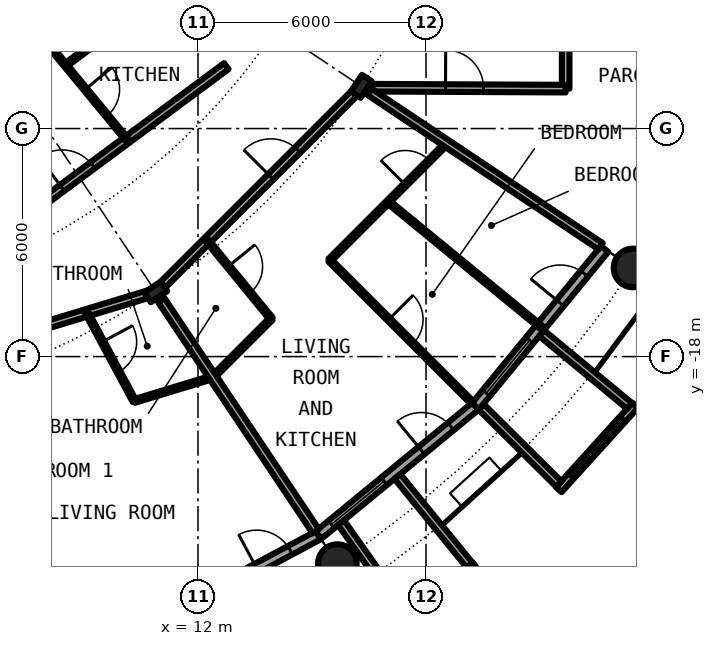
"""IFC4 building model, lengths in metres.
Left out: names, types, materials, properties, quantities, classifications, styles, units other than length and angle.
Written with IfcOpenShell. Run it as: python <this file> out.ifc"""

import sys

from ifc_helpers import new_model, si_unit, direction, frame, frame_2d, origin, origin_2d, place, context, subcontext, project, spatial, rectangle, circle, hollow_circle, i_section, extrude, element, fill, save


model = new_model("IFC4")
c1 = context("Model", 3, precision=1e-05, world=origin(), true_north=direction((0.0, 1.0)))
c2 = subcontext(c1, "Body", "Model", "MODEL_VIEW")
j1 = project(units=[si_unit("LENGTHUNIT", "METRE"), si_unit("PLANEANGLEUNIT", "RADIAN")], contexts=[c1])
p1 = place(None, origin())
s1 = spatial("IfcSite", under=j1, at=p1, CompositionType="ELEMENT")
p2 = place(p1, origin())
s2 = spatial("IfcBuilding", under=s1, at=p2, CompositionType="ELEMENT")
p3 = place(p2, frame((0.0, 0.0, 91.05)))
s3 = spatial("IfcBuildingStorey", under=s2, at=p3, CompositionType="ELEMENT", Elevation=91.05)
for number, where, z_axis, x_axis in (
    (1, (15.667, -23.448, 0.0), (0.0, 0.0, 1.0), (1.0, 0.0, 0.0)),
    (2, (23.448, -15.667, 0.0), (0.0, 0.0, 1.0), (1.0, 0.0, 0.0)),
):
    element("IfcColumn", number, at=place(p3, frame(where, z_axis=z_axis, x_axis=x_axis)), inside=s3, PredefinedType="COLUMN", context=c2, shape_type="SweptSolid", body=[
        extrude(hollow_circle(Radius=0.508, WallThickness=0.04, at=origin_2d()), origin(), (0.0, 0.0, 1.0), 3.05),
    ])
for number, where, z_axis, x_axis in (
    (3, (10.889, -16.297, 0.0), (0.0, 0.0, 1.0), (0.556, -0.831, 0.0)),
    (4, (16.297, -10.889, 0.0), (0.0, 0.0, 1.0), (0.831, -0.556, 0.0)),
):
    element("IfcColumn", number, at=place(p3, frame(where, z_axis=z_axis, x_axis=x_axis)), inside=s3, PredefinedType="COLUMN", context=c2, shape_type="SweptSolid", body=[
        extrude(i_section(OverallWidth=0.306, OverallDepth=0.524, WebThickness=0.021, FlangeThickness=0.04, FilletRadius=0.027, at=origin_2d()), origin(), (0.0, 0.0, 1.0), 3.05),
    ])
p4 = place(p3, frame((10.447, -25.222, 0.0), z_axis=(0.0, 0.0, 1.0), x_axis=(0.881915646801, 0.471407246368, 0.0)))
e5 = element("IfcWall", 5, at=p4, inside=s3, PredefinedType="SOLIDWALL", context=c2, shape_type="SweptSolid", body=[
    extrude(rectangle(XDim=5.352, YDim=0.25, at=frame_2d((2.676, 0.0))), origin(), (0.0, 0.0, 1.0), 2.7),
])
p5 = place(p4, frame((0.441, 0.0, 0.3)))
e6 = element("IfcOpeningElement", 6, at=p5, cuts=e5, PredefinedType="OPENING", context=c2, shape_type="SweptSolid", body=[
    extrude(rectangle(XDim=1.8, YDim=2.1, at=frame_2d((0.9, 1.05))), frame((0.0, 0.135, 0.0), z_axis=(0.0, -1.0, 0.0), x_axis=(1.0, 0.0, 0.0)), (0.0, 0.0, 1.0), 0.27),
])
p6 = place(p4, frame((3.51, 0.0, 0.0)))
e7 = element("IfcOpeningElement", 7, at=p6, cuts=e5, PredefinedType="OPENING", context=c2, shape_type="SweptSolid", body=[
    extrude(rectangle(XDim=1.0, YDim=2.2, at=frame_2d((0.5, 1.1))), frame((0.0, 0.135, 0.0), z_axis=(0.0, -1.0, 0.0), x_axis=(1.0, 0.0, 0.0)), (0.0, 0.0, 1.0), 0.27),
])
p7 = place(p3, frame((15.167, -22.699, 0.0), z_axis=(0.0, 0.0, 1.0), x_axis=(0.773019449054, 0.634382322723, 0.0)))
e8 = element("IfcWall", 8, at=p7, inside=s3, PredefinedType="SOLIDWALL", context=c2, shape_type="SweptSolid", body=[
    extrude(rectangle(XDim=5.352, YDim=0.25, at=frame_2d((2.676, 0.0))), origin(), (0.0, 0.0, 1.0), 2.7),
])
p8 = place(p7, frame((0.441, 0.0, 0.3)))
e9 = element("IfcOpeningElement", 9, at=p8, cuts=e8, PredefinedType="OPENING", context=c2, shape_type="SweptSolid", body=[
    extrude(rectangle(XDim=1.8, YDim=2.1, at=frame_2d((0.9, 1.05))), frame((0.0, 0.135, 0.0), z_axis=(0.0, -1.0, 0.0), x_axis=(1.0, 0.0, 0.0)), (0.0, 0.0, 1.0), 0.27),
])
p9 = place(p7, frame((3.51, 0.0, 0.0)))
e10 = element("IfcOpeningElement", 10, at=p9, cuts=e8, PredefinedType="OPENING", context=c2, shape_type="SweptSolid", body=[
    extrude(rectangle(XDim=1.0, YDim=2.2, at=frame_2d((0.5, 1.1))), frame((0.0, 0.135, 0.0), z_axis=(0.0, -1.0, 0.0), x_axis=(1.0, 0.0, 0.0)), (0.0, 0.0, 1.0), 0.27),
])
p10 = place(p3, frame((17.427, -24.909, -0.03), z_axis=(0.0, 0.0, 1.0), x_axis=(0.796842165306, 0.60418752353, 0.0)))
e11 = element("IfcWall", 11, at=p10, inside=s3, PredefinedType="SOLIDWALL", context=c2, shape_type="SweptSolid", body=[
    extrude(rectangle(XDim=2.337, YDim=0.2, at=frame_2d((1.168, 0.0))), origin(), (0.0, 0.0, 1.0), 2.73),
])
p11 = place(p10, frame((0.128, 0.0, 0.33)))
e12 = element("IfcOpeningElement", 12, at=p11, cuts=e11, PredefinedType="OPENING", context=c2, shape_type="SweptSolid", body=[
    extrude(circle(Radius=1.04, at=frame_2d((1.04, 1.04))), frame((0.0, 0.11, 0.0), z_axis=(0.0, -1.0, 0.0), x_axis=(1.0, 0.0, 0.0)), (0.0, 0.0, 1.0), 0.22),
])
p12 = place(p3, frame((15.765, -22.37, -0.03), z_axis=(0.0, 0.0, 1.0), x_axis=(0.576274612209, -0.817256123454, 0.0)))
e13 = element("IfcWall", 13, at=p12, inside=s3, PredefinedType="SOLIDWALL", context=c2, shape_type="SweptSolid", body=[
    extrude(rectangle(XDim=2.933, YDim=0.2, at=frame_2d((1.466, 0.0))), origin(), (0.0, 0.0, 1.0), 2.73),
])
p13 = place(p3, frame((17.246, -21.155, -0.03), z_axis=(0.0, 0.0, 1.0), x_axis=(0.631741648902, -0.775179004516, 0.0)))
e14 = element("IfcWall", 14, at=p13, inside=s3, PredefinedType="SOLIDWALL", context=c2, shape_type="SweptSolid", body=[
    extrude(rectangle(XDim=3.006, YDim=0.2, at=frame_2d((1.503, 0.0))), origin(), (0.0, 0.0, 1.0), 2.73),
])
p14 = place(p3, frame((19.304, -19.304, 0.0), z_axis=(0.0, 0.0, 1.0), x_axis=(0.634382322723, 0.773019449054, 0.0)))
e15 = element("IfcWall", 15, at=p14, inside=s3, PredefinedType="SOLIDWALL", context=c2, shape_type="SweptSolid", body=[
    extrude(rectangle(XDim=5.352, YDim=0.25, at=frame_2d((2.676, 0.0))), origin(), (0.0, 0.0, 1.0), 2.7),
])
p15 = place(p14, frame((0.441, 0.0, 0.3)))
e16 = element("IfcOpeningElement", 16, at=p15, cuts=e15, PredefinedType="OPENING", context=c2, shape_type="SweptSolid", body=[
    extrude(rectangle(XDim=1.8, YDim=2.1, at=frame_2d((0.9, 1.05))), frame((0.0, 0.135, 0.0), z_axis=(0.0, -1.0, 0.0), x_axis=(1.0, 0.0, 0.0)), (0.0, 0.0, 1.0), 0.27),
])
p16 = place(p14, frame((3.51, 0.0, 0.0)))
e17 = element("IfcOpeningElement", 17, at=p16, cuts=e15, PredefinedType="OPENING", context=c2, shape_type="SweptSolid", body=[
    extrude(rectangle(XDim=1.0, YDim=2.2, at=frame_2d((0.5, 1.1))), frame((0.0, 0.135, 0.0), z_axis=(0.0, -1.0, 0.0), x_axis=(1.0, 0.0, 0.0)), (0.0, 0.0, 1.0), 0.27),
])
p17 = place(p3, frame((21.493, -21.5, -0.03), z_axis=(0.0, 0.0, 1.0), x_axis=(0.671506829416, 0.740998365753, 0.0)))
e18 = element("IfcWall", 18, at=p17, inside=s3, PredefinedType="SOLIDWALL", context=c2, shape_type="SweptSolid", body=[
    extrude(rectangle(XDim=2.993, YDim=0.2, at=frame_2d((1.497, 0.0))), origin(), (0.0, 0.0, 1.0), 2.73),
])
p18 = place(p17, frame((0.457, 0.0, 0.33)))
e19 = element("IfcOpeningElement", 19, at=p18, cuts=e18, PredefinedType="OPENING", context=c2, shape_type="SweptSolid", body=[
    extrude(circle(Radius=1.04, at=frame_2d((1.04, 1.04))), frame((0.0, 0.11, 0.0), z_axis=(0.0, -1.0, 0.0), x_axis=(1.0, 0.0, 0.0)), (0.0, 0.0, 1.0), 0.22),
])
p19 = place(p3, frame((19.45, -19.323, -0.03), z_axis=(0.0, 0.0, 1.0), x_axis=(0.709727076896, -0.704476739375, 0.0)))
e20 = element("IfcWall", 20, at=p19, inside=s3, PredefinedType="SOLIDWALL", context=c2, shape_type="SweptSolid", body=[
    extrude(rectangle(XDim=2.883, YDim=0.2, at=frame_2d((1.441, 0.0))), origin(), (0.0, 0.0, 1.0), 2.73),
])
p20 = place(p3, frame((21.041, -17.384, -0.03), z_axis=(0.0, 0.0, 1.0), x_axis=(0.770784861449, -0.63709551667, 0.0)))
e21 = element("IfcWall", 21, at=p20, inside=s3, PredefinedType="SOLIDWALL", context=c2, shape_type="SweptSolid", body=[
    extrude(rectangle(XDim=3.006, YDim=0.2, at=frame_2d((1.503, 0.0))), origin(), (0.0, 0.0, 1.0), 2.73),
])
p21 = place(p3, frame((12.389, -18.542, 0.0), z_axis=(0.0, 0.0, 1.0), x_axis=(0.707106781187, 0.707106781187, 0.0)))
e22 = element("IfcWall", 22, at=p21, inside=s3, PredefinedType="PARTITIONING", context=c2, shape_type="SweptSolid", body=[
    extrude(rectangle(XDim=2.175, YDim=0.1, at=frame_2d((1.088, 0.0))), origin(), (0.0, 0.0, 1.0), 2.7),
])
p22 = place(p3, frame((15.468, -15.463, 0.0), z_axis=(0.0, 0.0, 1.0), x_axis=(0.707106781187, 0.707106781187, 0.0)))
e23 = element("IfcWall", 23, at=p22, inside=s3, PredefinedType="PARTITIONING", context=c2, shape_type="SweptSolid", body=[
    extrude(rectangle(XDim=4.351, YDim=0.1, at=frame_2d((2.176, 0.0))), origin(), (0.0, 0.0, 1.0), 2.7),
])
p23 = place(p22, frame((2.808, 0.0, 0.0)))
e24 = element("IfcOpeningElement", 24, at=p23, cuts=e23, PredefinedType="OPENING", context=c2, shape_type="SweptSolid", body=[
    extrude(rectangle(XDim=0.9, YDim=2.3, at=frame_2d((0.45, 1.15))), frame((0.0, 0.06, 0.0), z_axis=(0.0, -1.0, 0.0), x_axis=(1.0, 0.0, 0.0)), (0.0, 0.0, 1.0), 0.12),
])
p24 = place(p3, frame((21.675, -10.95, 0.0), z_axis=(0.0, 0.0, 1.0), x_axis=(0.0, 1.0, 0.0)))
e25 = element("IfcWall", 25, at=p24, inside=s3, PredefinedType="PARTITIONING", context=c2, shape_type="SweptSolid", body=[
    extrude(rectangle(XDim=1.65, YDim=0.2, at=frame_2d((0.825, 0.0))), origin(), (0.0, 0.0, 1.0), 2.7),
])
p25 = place(p3, frame((10.327, -19.168, 0.0), z_axis=(0.0, 0.0, 1.0), x_axis=(0.956877769253, 0.290490851335, 0.0)))
e26 = element("IfcWall", 26, at=p25, inside=s3, PredefinedType="PARTITIONING", context=c2, shape_type="SweptSolid", body=[
    extrude(rectangle(XDim=2.158, YDim=0.1, at=frame_2d((1.079, 0.0))), origin(), (0.0, 0.0, 1.0), 2.7),
])
p26 = place(p3, frame((11.0, -16.186, 0.0), z_axis=(0.0, 0.0, 1.0), x_axis=(0.707106781187, 0.707106781187, 0.0)))
e27 = element("IfcWall", 27, at=p26, inside=s3, PredefinedType="PARTITIONING", context=c2, shape_type="SweptSolid", body=[
    extrude(rectangle(XDim=7.334, YDim=0.2, at=frame_2d((3.667, 0.0))), origin(), (0.0, 0.0, 1.0), 2.38),
])
p27 = place(p26, frame((4.123, 0.0, 0.0)))
e28 = element("IfcOpeningElement", 28, at=p27, cuts=e27, PredefinedType="OPENING", context=c2, shape_type="SweptSolid", body=[
    extrude(rectangle(XDim=1.0, YDim=2.3, at=frame_2d((0.5, 1.15))), frame((0.0, 0.11, 0.0), z_axis=(0.0, -1.0, 0.0), x_axis=(1.0, 0.0, 0.0)), (0.0, 0.0, 1.0), 0.22),
])
p28 = place(p3, frame((0.0, -19.6, 0.0), z_axis=(0.0, 0.0, 1.0), x_axis=(0.956932298225, 0.290311172044, 0.0)))
e29 = element("IfcWall", 29, at=p28, inside=s3, PredefinedType="PARTITIONING", context=c2, shape_type="SweptSolid", body=[
    extrude(rectangle(XDim=11.219, YDim=0.2, at=frame_2d((5.61, 0.0))), origin(), (0.0, 0.0, 1.0), 2.38),
])
p29 = place(p28, frame((7.086, 0.0, 0.0)))
e30 = element("IfcOpeningElement", 30, at=p29, cuts=e29, PredefinedType="OPENING", context=c2, shape_type="SweptSolid", body=[
    extrude(rectangle(XDim=1.0, YDim=2.3, at=frame_2d((0.5, 1.15))), frame((0.0, 0.11, 0.0), z_axis=(0.0, -1.0, 0.0), x_axis=(1.0, 0.0, 0.0)), (0.0, 0.0, 1.0), 0.22),
])
p30 = place(p3, frame((4.906, -16.172, 0.0), z_axis=(0.0, 0.0, 1.0), x_axis=(0.803191461888, 0.595720971219, 0.0)))
e31 = element("IfcWall", 31, at=p30, inside=s3, PredefinedType="PARTITIONING", context=c2, shape_type="SweptSolid", body=[
    extrude(rectangle(XDim=9.76, YDim=0.2, at=frame_2d((4.88, 0.0))), origin(), (0.0, 0.0, 1.0), 2.7),
])
p31 = place(p30, frame((4.38, 0.0, 0.0)))
e32 = element("IfcOpeningElement", 32, at=p31, cuts=e31, PredefinedType="OPENING", context=c2, shape_type="SweptSolid", body=[
    extrude(rectangle(XDim=1.0, YDim=2.3, at=frame_2d((0.5, 1.15))), frame((0.0, 0.11, 0.0), z_axis=(0.0, -1.0, 0.0), x_axis=(1.0, 0.0, 0.0)), (0.0, 0.0, 1.0), 0.22),
])
p32 = place(p3, frame((8.513, -10.332, 0.0), z_axis=(0.0, 0.0, 1.0), x_axis=(0.803135014325, 0.595797070121, 0.0)))
e33 = element("IfcWall", 33, at=p32, inside=s3, PredefinedType="PARTITIONING", context=c2, shape_type="SweptSolid", body=[
    extrude(rectangle(XDim=1.732, YDim=0.1, at=frame_2d((0.866, 0.0))), origin(), (0.0, 0.0, 1.0), 2.7),
])
p33 = place(p3, frame((16.588, -10.925, 0.0), z_axis=(0.0, 0.0, 1.0), x_axis=(0.999988019025, -0.004895079807, 0.0)))
e34 = element("IfcWall", 34, at=p33, inside=s3, PredefinedType="PARTITIONING", context=c2, shape_type="SweptSolid", body=[
    extrude(rectangle(XDim=5.087, YDim=0.2, at=frame_2d((2.543, 0.0))), origin(), (0.0, 0.0, 1.0), 2.7),
])
p34 = place(p33, frame((1.925, 0.0, 0.0)))
e35 = element("IfcOpeningElement", 35, at=p34, cuts=e34, PredefinedType="OPENING", context=c2, shape_type="SweptSolid", body=[
    extrude(rectangle(XDim=1.0, YDim=2.3, at=frame_2d((0.5, 1.15))), frame((0.0, 0.11, 0.0), z_axis=(0.0, -1.0, 0.0), x_axis=(1.0, 0.0, 0.0)), (0.0, 0.0, 1.0), 0.22),
])
p35 = place(p3, frame((4.908, -5.959, 0.0), z_axis=(0.0, 0.0, 1.0), x_axis=(0.636105207978, -0.771602335652, 0.0)))
e36 = element("IfcWall", 36, at=p35, inside=s3, PredefinedType="PARTITIONING", context=c2, shape_type="SweptSolid", body=[
    extrude(rectangle(XDim=8.213, YDim=0.1, at=frame_2d((4.106, 0.0))), origin(), (0.0, 0.0, 1.0), 2.7),
])
p36 = place(p35, frame((6.49, 0.0, 0.0)))
e37 = element("IfcOpeningElement", 37, at=p36, cuts=e36, PredefinedType="OPENING", context=c2, shape_type="SweptSolid", body=[
    extrude(rectangle(XDim=0.9, YDim=2.3, at=frame_2d((0.45, 1.15))), frame((0.0, 0.06, 0.0), z_axis=(0.0, -1.0, 0.0), x_axis=(1.0, 0.0, 0.0)), (0.0, 0.0, 1.0), 0.12),
])
p37 = place(p35, frame((2.384, 0.0, 0.0)))
e38 = element("IfcOpeningElement", 38, at=p37, cuts=e36, PredefinedType="OPENING", context=c2, shape_type="SweptSolid", body=[
    extrude(rectangle(XDim=0.9, YDim=2.3, at=frame_2d((0.45, 1.15))), frame((0.0, 0.06, 0.0), z_axis=(0.0, -1.0, 0.0), x_axis=(1.0, 0.0, 0.0)), (0.0, 0.0, 1.0), 0.12),
])
p38 = place(p3, frame((9.074, -16.847, 0.0), z_axis=(0.0, 0.0, 1.0), x_axis=(0.474160570331, -0.880438387136, 0.0)))
e39 = element("IfcWall", 39, at=p38, inside=s3, PredefinedType="PARTITIONING", context=c2, shape_type="SweptSolid", body=[
    extrude(rectangle(XDim=2.636, YDim=0.1, at=frame_2d((1.318, 0.0))), origin(), (0.0, 0.0, 1.0), 2.7),
])
p39 = place(p38, frame((0.868, 0.0, 0.0)))
e40 = element("IfcOpeningElement", 40, at=p39, cuts=e39, PredefinedType="OPENING", context=c2, shape_type="SweptSolid", body=[
    extrude(rectangle(XDim=0.9, YDim=2.3, at=frame_2d((0.45, 1.15))), frame((0.0, 0.06, 0.0), z_axis=(0.0, -1.0, 0.0), x_axis=(1.0, 0.0, 0.0)), (0.0, 0.0, 1.0), 0.12),
])
p40 = place(p3, frame((11.034, -16.515, 0.0), z_axis=(0.0, 0.0, 1.0), x_axis=(0.555701298605, -0.831382022135, 0.0)))
e41 = element("IfcWall", 41, at=p40, inside=s3, PredefinedType="PARTITIONING", context=c2, shape_type="SweptSolid", body=[
    extrude(rectangle(XDim=7.313, YDim=0.2, at=frame_2d((3.657, 0.0))), origin(), (0.0, 0.0, 1.0), 2.7),
])
p41 = place(p3, frame((12.241, -14.945, 0.0), z_axis=(0.0, 0.0, 1.0), x_axis=(0.633582447834, -0.77367517848, 0.0)))
e42 = element("IfcWall", 42, at=p41, inside=s3, PredefinedType="PARTITIONING", context=c2, shape_type="SweptSolid", body=[
    extrude(rectangle(XDim=2.661, YDim=0.1, at=frame_2d((1.331, 0.0))), origin(), (0.0, 0.0, 1.0), 2.7),
])
p42 = place(p41, frame((0.881, 0.0, 0.0)))
e43 = element("IfcOpeningElement", 43, at=p42, cuts=e42, PredefinedType="OPENING", context=c2, shape_type="SweptSolid", body=[
    extrude(rectangle(XDim=0.9, YDim=2.3, at=frame_2d((0.45, 1.15))), frame((0.0, 0.06, 0.0), z_axis=(0.0, -1.0, 0.0), x_axis=(1.0, 0.0, 0.0)), (0.0, 0.0, 1.0), 0.12),
])
p43 = place(p3, frame((15.465, -15.465, 0.0), z_axis=(0.0, 0.0, 1.0), x_axis=(0.707106781187, -0.707106781187, 0.0)))
e44 = element("IfcWall", 44, at=p43, inside=s3, PredefinedType="PARTITIONING", context=c2, shape_type="SweptSolid", body=[
    extrude(rectangle(XDim=5.305, YDim=0.1, at=frame_2d((2.652, 0.0))), origin(), (0.0, 0.0, 1.0), 2.7),
])
p44 = place(p43, frame((2.202, 0.0, 0.0)))
e45 = element("IfcOpeningElement", 45, at=p44, cuts=e44, PredefinedType="OPENING", context=c2, shape_type="SweptSolid", body=[
    extrude(rectangle(XDim=0.9, YDim=2.3, at=frame_2d((0.45, 1.15))), frame((0.0, 0.06, 0.0), z_axis=(0.0, -1.0, 0.0), x_axis=(1.0, 0.0, 0.0)), (0.0, 0.0, 1.0), 0.12),
])
p45 = place(p3, frame((16.515, -11.035, 0.0), z_axis=(0.0, 0.0, 1.0), x_axis=(0.831505405283, -0.555516661303, 0.0)))
e46 = element("IfcWall", 46, at=p45, inside=s3, PredefinedType="PARTITIONING", context=c2, shape_type="SweptSolid", body=[
    extrude(rectangle(XDim=7.312, YDim=0.2, at=frame_2d((3.656, 0.0))), origin(), (0.0, 0.0, 1.0), 2.7),
])
p46 = place(p3, frame((17.004, -13.927, 0.0), z_axis=(0.0, 0.0, 1.0), x_axis=(0.773517471898, -0.633774976367, 0.0)))
e47 = element("IfcWall", 47, at=p46, inside=s3, PredefinedType="PARTITIONING", context=c2, shape_type="SweptSolid", body=[
    extrude(rectangle(XDim=5.196, YDim=0.1, at=frame_2d((2.598, 0.0))), origin(), (0.0, 0.0, 1.0), 2.7),
])
p47 = place(p6, origin())
e48 = element("IfcDoor", 48, at=p47, inside=s3, OperationType="SINGLE_SWING_LEFT", PredefinedType="DOOR", context=c2, shape_type="SweptSolid", body=[
    extrude(rectangle(XDim=1.0, YDim=2.2, at=frame_2d((0.5, 1.1))), frame((0.0, 0.025, 0.0), z_axis=(0.0, -1.0, 0.0), x_axis=(1.0, 0.0, 0.0)), (0.0, 0.0, 1.0), 0.05),
])
fill(e7, e48)
p48 = place(p8, origin())
e49 = element("IfcWindow", 49, at=p48, inside=s3, PartitioningType="SINGLE_PANEL", PredefinedType="WINDOW", context=c2, shape_type="SweptSolid", body=[
    extrude(rectangle(XDim=1.8, YDim=2.1, at=frame_2d((0.9, 1.05))), frame((0.0, 0.03, 0.0), z_axis=(0.0, -1.0, 0.0), x_axis=(1.0, 0.0, 0.0)), (0.0, 0.0, 1.0), 0.06),
])
fill(e9, e49)
p49 = place(p9, origin())
e50 = element("IfcDoor", 50, at=p49, inside=s3, OperationType="SINGLE_SWING_LEFT", PredefinedType="DOOR", context=c2, shape_type="SweptSolid", body=[
    extrude(rectangle(XDim=1.0, YDim=2.2, at=frame_2d((0.5, 1.1))), frame((0.0, 0.025, 0.0), z_axis=(0.0, -1.0, 0.0), x_axis=(1.0, 0.0, 0.0)), (0.0, 0.0, 1.0), 0.05),
])
fill(e10, e50)
p50 = place(p15, origin())
e51 = element("IfcWindow", 51, at=p50, inside=s3, PartitioningType="SINGLE_PANEL", PredefinedType="WINDOW", context=c2, shape_type="SweptSolid", body=[
    extrude(rectangle(XDim=1.8, YDim=2.1, at=frame_2d((0.9, 1.05))), frame((0.0, 0.03, 0.0), z_axis=(0.0, -1.0, 0.0), x_axis=(1.0, 0.0, 0.0)), (0.0, 0.0, 1.0), 0.06),
])
fill(e16, e51)
p51 = place(p18, origin())
e52 = element("IfcWindow", 52, at=p51, inside=s3, PartitioningType="SINGLE_PANEL", PredefinedType="WINDOW", context=c2, shape_type="SweptSolid", body=[
    extrude(circle(Radius=1.04, at=frame_2d((1.04, 1.04))), frame((0.0, 0.03, 0.0), z_axis=(0.0, -1.0, 0.0), x_axis=(1.0, 0.0, 0.0)), (0.0, 0.0, 1.0), 0.06),
])
fill(e19, e52)
p52 = place(p16, origin())
e53 = element("IfcDoor", 53, at=p52, inside=s3, OperationType="SINGLE_SWING_LEFT", PredefinedType="DOOR", context=c2, shape_type="SweptSolid", body=[
    extrude(rectangle(XDim=1.0, YDim=2.2, at=frame_2d((0.5, 1.1))), frame((0.0, 0.025, 0.0), z_axis=(0.0, -1.0, 0.0), x_axis=(1.0, 0.0, 0.0)), (0.0, 0.0, 1.0), 0.05),
])
fill(e17, e53)
p53 = place(p39, origin())
e54 = element("IfcDoor", 54, at=p53, inside=s3, OperationType="SINGLE_SWING_RIGHT", PredefinedType="DOOR", context=c2, shape_type="SweptSolid", body=[
    extrude(rectangle(XDim=0.9, YDim=2.3, at=frame_2d((0.45, 1.15))), frame((0.0, 0.025, 0.0), z_axis=(0.0, -1.0, 0.0), x_axis=(1.0, 0.0, 0.0)), (0.0, 0.0, 1.0), 0.05),
])
fill(e40, e54)
p54 = place(p27, origin())
e55 = element("IfcDoor", 55, at=p54, inside=s3, OperationType="SINGLE_SWING_RIGHT", PredefinedType="DOOR", context=c2, shape_type="SweptSolid", body=[
    extrude(rectangle(XDim=1.0, YDim=2.3, at=frame_2d((0.5, 1.15))), frame((0.0, 0.025, 0.0), z_axis=(0.0, -1.0, 0.0), x_axis=(1.0, 0.0, 0.0)), (0.0, 0.0, 1.0), 0.05),
])
fill(e28, e55)
p55 = place(p42, origin())
e56 = element("IfcDoor", 56, at=p55, inside=s3, OperationType="SINGLE_SWING_LEFT", PredefinedType="DOOR", context=c2, shape_type="SweptSolid", body=[
    extrude(rectangle(XDim=0.9, YDim=2.3, at=frame_2d((0.45, 1.15))), frame((0.0, 0.025, 0.0), z_axis=(0.0, -1.0, 0.0), x_axis=(1.0, 0.0, 0.0)), (0.0, 0.0, 1.0), 0.05),
])
fill(e43, e56)
p56 = place(p44, origin())
e57 = element("IfcDoor", 57, at=p56, inside=s3, OperationType="SINGLE_SWING_RIGHT", PredefinedType="DOOR", context=c2, shape_type="SweptSolid", body=[
    extrude(rectangle(XDim=0.9, YDim=2.3, at=frame_2d((0.45, 1.15))), frame((0.0, 0.025, 0.0), z_axis=(0.0, -1.0, 0.0), x_axis=(1.0, 0.0, 0.0)), (0.0, 0.0, 1.0), 0.05),
])
fill(e45, e57)
p57 = place(p23, origin())
e58 = element("IfcDoor", 58, at=p57, inside=s3, OperationType="SINGLE_SWING_RIGHT", PredefinedType="DOOR", context=c2, shape_type="SweptSolid", body=[
    extrude(rectangle(XDim=0.9, YDim=2.3, at=frame_2d((0.45, 1.15))), frame((0.0, 0.025, 0.0), z_axis=(0.0, -1.0, 0.0), x_axis=(1.0, 0.0, 0.0)), (0.0, 0.0, 1.0), 0.05),
])
fill(e24, e58)
p58 = place(p31, origin())
e59 = element("IfcDoor", 59, at=p58, inside=s3, OperationType="SINGLE_SWING_LEFT", PredefinedType="DOOR", context=c2, shape_type="SweptSolid", body=[
    extrude(rectangle(XDim=1.0, YDim=2.3, at=frame_2d((0.5, 1.15))), frame((0.0, 0.025, 0.0), z_axis=(0.0, -1.0, 0.0), x_axis=(1.0, 0.0, 0.0)), (0.0, 0.0, 1.0), 0.05),
])
fill(e32, e59)
p59 = place(p36, origin())
e60 = element("IfcDoor", 60, at=p59, inside=s3, OperationType="SINGLE_SWING_RIGHT", PredefinedType="DOOR", context=c2, shape_type="SweptSolid", body=[
    extrude(rectangle(XDim=0.9, YDim=2.3, at=frame_2d((0.45, 1.15))), frame((0.0, 0.025, 0.0), z_axis=(0.0, -1.0, 0.0), x_axis=(1.0, 0.0, 0.0)), (0.0, 0.0, 1.0), 0.05),
])
fill(e37, e60)
p60 = place(p34, origin())
e61 = element("IfcDoor", 61, at=p60, inside=s3, OperationType="SINGLE_SWING_LEFT", PredefinedType="DOOR", context=c2, shape_type="SweptSolid", body=[
    extrude(rectangle(XDim=1.0, YDim=2.3, at=frame_2d((0.5, 1.15))), frame((0.0, 0.025, 0.0), z_axis=(0.0, -1.0, 0.0), x_axis=(1.0, 0.0, 0.0)), (0.0, 0.0, 1.0), 0.05),
])
fill(e35, e61)
save(model, sys.argv[1])
